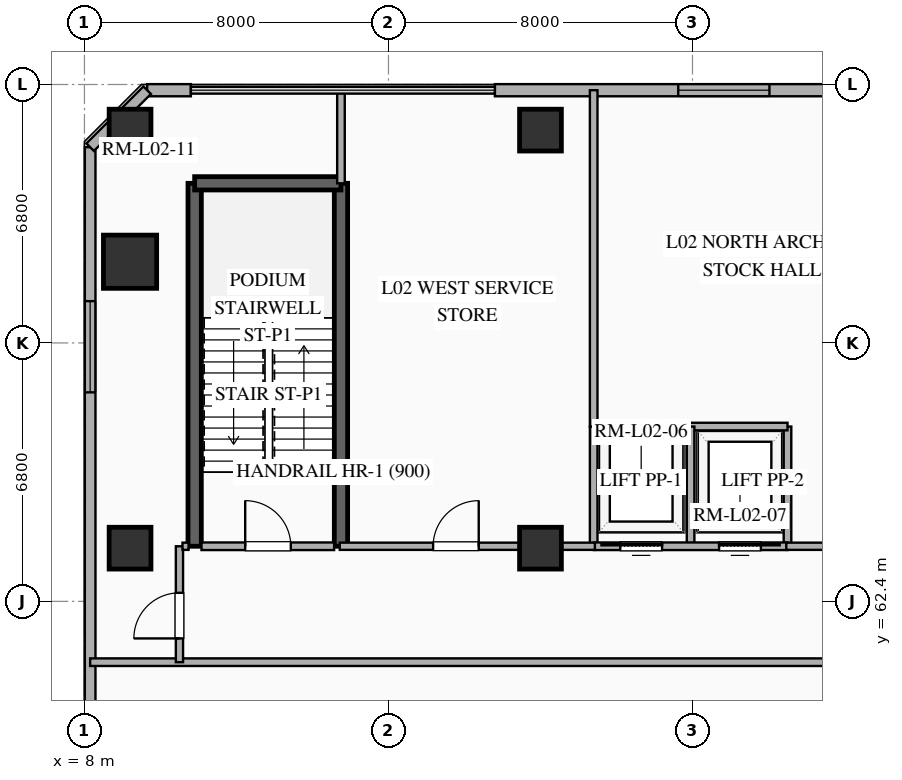
"""IFC4 building model, lengths in metres.
Left out: names, types, materials, properties, quantities, classifications, styles, units other than length and angle.
Written with IfcOpenShell. Run it as: python <this file> out.ifc"""

import sys

from ifc_helpers import new_model, si_unit, direction, frame, frame_2d, origin, origin_2d, place, context, subcontext, project, spatial, rectangle, extrude, element, fill, save


model = new_model("IFC4")
c1 = context("Model", 3, precision=1e-05, world=origin(), true_north=direction((0.0, 1.0)))
c2 = subcontext(c1, "Body", "Model", "MODEL_VIEW")
j1 = project(units=[si_unit("LENGTHUNIT", "METRE"), si_unit("PLANEANGLEUNIT", "RADIAN")], contexts=[c1])
p1 = place(None, origin())
s1 = spatial("IfcSite", under=j1, at=p1, CompositionType="ELEMENT")
p2 = place(p1, origin())
s2 = spatial("IfcBuilding", under=s1, at=p2, CompositionType="ELEMENT")
p3 = place(p2, frame((0.0, 0.0, 11.4)))
s3 = spatial("IfcBuildingStorey", under=s2, at=p3, CompositionType="ELEMENT", Elevation=11.4)
for number, where, z_axis, x_axis in (
    (1, (9.2, 74.8, 0.0), (0.0, 0.0, 1.0), (1.0, 0.0, 0.0)),
    (2, (9.2, 63.8, 0.0), (0.0, 0.0, 1.0), (1.0, 0.0, 0.0)),
    (3, (20.0, 74.8, 0.0), (0.0, 0.0, 1.0), (1.0, 0.0, 0.0)),
    (4, (20.0, 63.8, 0.0), (0.0, 0.0, 1.0), (1.0, 0.0, 0.0)),
):
    element("IfcColumn", number, at=place(p3, frame(where, z_axis=z_axis, x_axis=x_axis)), inside=s3, PredefinedType="COLUMN", context=c2, shape_type="SweptSolid", body=[
        extrude(rectangle(XDim=1.1, YDim=1.1, at=origin_2d()), origin(), (0.0, 0.0, 1.0), 5.1),
    ])
p4 = place(p3, frame((9.2, 71.337, 0.0), z_axis=(0.0, 0.0, 1.0), x_axis=(1.0, 0.0, 0.0)))
e5 = element("IfcColumn", 5, at=p4, inside=s3, PredefinedType="COLUMN", context=c2, shape_type="SweptSolid", body=[
    extrude(rectangle(XDim=1.4, YDim=1.4, at=origin_2d()), origin(), (0.0, 0.0, 1.0), 5.1),
])
for number, where, z_axis, x_axis in (
    (6, (10.9, 63.85, 0.0), (0.0, 0.0, 1.0), (0.0, 1.0, 0.0)),
    (7, (14.75, 63.85, 0.0), (0.0, 0.0, 1.0), (0.0, 1.0, 0.0)),
):
    element("IfcWall", number, at=place(p3, frame(where, z_axis=z_axis, x_axis=x_axis)), inside=s3, PredefinedType="SHEAR", context=c2, shape_type="SweptSolid", body=[
        extrude(rectangle(XDim=9.55, YDim=0.35, at=frame_2d((4.775, 0.0))), origin(), (0.0, 0.0, 1.0), 5.1),
    ])
p5 = place(p3, frame((10.9, 73.4, 0.0), z_axis=(0.0, 0.0, 1.0), x_axis=(1.0, 0.0, 0.0)))
e8 = element("IfcWall", 8, at=p5, inside=s3, PredefinedType="SHEAR", context=c2, shape_type="SweptSolid", body=[
    extrude(rectangle(XDim=3.85, YDim=0.35, at=frame_2d((1.925, 0.0))), origin(), (0.0, 0.0, 1.0), 5.1),
])
p6 = place(p3, frame((10.8, 75.85, 0.0), z_axis=(0.0, 0.0, 1.0), x_axis=(-1.0, 0.0, 0.0)))
e9 = element("IfcWall", 9, at=p6, inside=s3, PredefinedType="SOLIDWALL", context=c2, shape_type="SweptSolid", body=[
    extrude(rectangle(XDim=1.15, YDim=0.32, at=frame_2d((0.575, 0.0))), origin(), (0.0, 0.0, 1.0), 5.1),
])
p7 = place(p3, frame((18.8, 75.85, 0.0), z_axis=(0.0, 0.0, 1.0), x_axis=(1.0, 0.0, 0.0)))
e10 = element("IfcWall", 10, at=p7, inside=s3, PredefinedType="SOLIDWALL", context=c2, shape_type="SweptSolid", body=[
    extrude(rectangle(XDim=10.55, YDim=0.32, at=frame_2d((5.275, 0.0))), origin(), (0.0, 0.0, 1.0), 5.1),
])
p8 = place(p7, frame((4.825, 0.0, 0.9)))
e11 = element("IfcOpeningElement", 11, at=p8, cuts=e10, PredefinedType="OPENING", context=c2, shape_type="SweptSolid", body=[
    extrude(rectangle(XDim=2.4, YDim=2.6, at=frame_2d((1.2, 1.3))), frame((0.0, 0.17, 0.0), z_axis=(0.0, -1.0, 0.0), x_axis=(1.0, 0.0, 0.0)), (0.0, 0.0, 1.0), 0.34),
])
p9 = place(p3, frame((8.15, 33.0, 0.0), z_axis=(0.0, 0.0, 1.0), x_axis=(0.0, 1.0, 0.0)))
e12 = element("IfcWall", 12, at=p9, inside=s3, PredefinedType="SOLIDWALL", context=c2, shape_type="SweptSolid", body=[
    extrude(rectangle(XDim=41.35, YDim=0.28, at=frame_2d((20.675, 0.0))), origin(), (0.0, 0.0, 1.0), 5.1),
])
p10 = place(p9, frame((6.7, 0.0, 0.9)))
e13 = element("IfcOpeningElement", 13, at=p10, cuts=e12, PredefinedType="OPENING", context=c2, shape_type="SweptSolid", body=[
    extrude(rectangle(XDim=2.4, YDim=2.6, at=frame_2d((1.2, 1.3))), frame((0.0, 0.15, 0.0), z_axis=(0.0, -1.0, 0.0), x_axis=(1.0, 0.0, 0.0)), (0.0, 0.0, 1.0), 0.3),
])
p11 = place(p9, frame((21.225, 0.0, 0.9)))
e14 = element("IfcOpeningElement", 14, at=p11, cuts=e12, PredefinedType="OPENING", context=c2, shape_type="SweptSolid", body=[
    extrude(rectangle(XDim=2.4, YDim=2.6, at=frame_2d((1.2, 1.3))), frame((0.0, 0.15, 0.0), z_axis=(0.0, -1.0, 0.0), x_axis=(1.0, 0.0, 0.0)), (0.0, 0.0, 1.0), 0.3),
])
p12 = place(p9, frame((34.9, 0.0, 0.9)))
e15 = element("IfcOpeningElement", 15, at=p12, cuts=e12, PredefinedType="OPENING", context=c2, shape_type="SweptSolid", body=[
    extrude(rectangle(XDim=2.4, YDim=2.6, at=frame_2d((1.2, 1.3))), frame((0.0, 0.15, 0.0), z_axis=(0.0, -1.0, 0.0), x_axis=(1.0, 0.0, 0.0)), (0.0, 0.0, 1.0), 0.3),
])
p13 = place(p3, frame((9.65, 75.85, 0.0), z_axis=(0.0, 0.0, 1.0), x_axis=(-0.707106781187, -0.707106781187, 0.0)))
e16 = element("IfcWall", 16, at=p13, inside=s3, PredefinedType="SOLIDWALL", context=c2, shape_type="SweptSolid", body=[
    extrude(rectangle(XDim=2.121, YDim=0.28, at=frame_2d((1.061, 0.0))), origin(), (0.0, 0.0, 1.0), 5.1),
])
p14 = place(p3, frame((11.08, 63.85, 0.0), z_axis=(0.0, 0.0, 1.0), x_axis=(1.0, 0.0, 0.0)))
e17 = element("IfcWall", 17, at=p14, inside=s3, PredefinedType="SOLIDWALL", context=c2, shape_type="SweptSolid", body=[
    extrude(rectangle(XDim=3.49, YDim=0.2, at=frame_2d((1.745, 0.0))), origin(), (0.0, 0.0, 1.0), 4.3),
])
p15 = place(p14, frame((1.15, 0.0, 0.0)))
e18 = element("IfcOpeningElement", 18, at=p15, cuts=e17, PredefinedType="OPENING", context=c2, shape_type="SweptSolid", body=[
    extrude(rectangle(XDim=1.2, YDim=2.15, at=frame_2d((0.6, 1.075))), frame((0.0, 0.11, 0.0), z_axis=(0.0, -1.0, 0.0), x_axis=(1.0, 0.0, 0.0)), (0.0, 0.0, 1.0), 0.22),
])
for number, where, z_axis, x_axis in (
    (19, (21.4, 63.85, 0.0), (0.0, 0.0, 1.0), (0.0, 1.0, 0.0)),
    (20, (26.5, 63.85, 0.0), (0.0, 0.0, 1.0), (0.0, 1.0, 0.0)),
):
    element("IfcWall", number, at=place(p3, frame(where, z_axis=z_axis, x_axis=x_axis)), inside=s3, PredefinedType="SOLIDWALL", context=c2, shape_type="SweptSolid", body=[
        extrude(rectangle(XDim=3.15, YDim=0.2, at=frame_2d((1.575, 0.0))), origin(), (0.0, 0.0, 1.0), 4.3),
    ])
p16 = place(p3, frame((21.4, 67.0, 0.0), z_axis=(0.0, 0.0, 1.0), x_axis=(1.0, 0.0, 0.0)))
e21 = element("IfcWall", 21, at=p16, inside=s3, PredefinedType="SOLIDWALL", context=c2, shape_type="SweptSolid", body=[
    extrude(rectangle(XDim=5.1, YDim=0.2, at=frame_2d((2.55, 0.0))), origin(), (0.0, 0.0, 1.0), 4.3),
])
p17 = place(p3, frame((23.95, 63.85, 0.0), z_axis=(0.0, 0.0, 1.0), x_axis=(0.0, 1.0, 0.0)))
e22 = element("IfcWall", 22, at=p17, inside=s3, PredefinedType="SOLIDWALL", context=c2, shape_type="SweptSolid", body=[
    extrude(rectangle(XDim=3.15, YDim=0.2, at=frame_2d((1.575, 0.0))), origin(), (0.0, 0.0, 1.0), 4.3),
])
p18 = place(p3, frame((21.4, 63.85, 0.0), z_axis=(0.0, 0.0, 1.0), x_axis=(1.0, 0.0, 0.0)))
e23 = element("IfcWall", 23, at=p18, inside=s3, PredefinedType="SOLIDWALL", context=c2, shape_type="SweptSolid", body=[
    extrude(rectangle(XDim=5.1, YDim=0.2, at=frame_2d((2.55, 0.0))), origin(), (0.0, 0.0, 1.0), 4.3),
])
p19 = place(p18, frame((0.7, 0.0, 0.0)))
e24 = element("IfcOpeningElement", 24, at=p19, cuts=e23, PredefinedType="OPENING", context=c2, shape_type="SweptSolid", body=[
    extrude(rectangle(XDim=1.1, YDim=2.2, at=frame_2d((0.55, 1.1))), frame((0.0, 0.11, 0.0), z_axis=(0.0, -1.0, 0.0), x_axis=(1.0, 0.0, 0.0)), (0.0, 0.0, 1.0), 0.22),
])
p20 = place(p18, frame((3.3, 0.0, 0.0)))
e25 = element("IfcOpeningElement", 25, at=p20, cuts=e23, PredefinedType="OPENING", context=c2, shape_type="SweptSolid", body=[
    extrude(rectangle(XDim=1.1, YDim=2.2, at=frame_2d((0.55, 1.1))), frame((0.0, 0.11, 0.0), z_axis=(0.0, -1.0, 0.0), x_axis=(1.0, 0.0, 0.0)), (0.0, 0.0, 1.0), 0.22),
])
p21 = place(p3, frame((8.15, 60.8, 0.0), z_axis=(0.0, 0.0, 1.0), x_axis=(1.0, 0.0, 0.0)))
e26 = element("IfcWall", 26, at=p21, inside=s3, PredefinedType="PARTITIONING", context=c2, shape_type="SweptSolid", body=[
    extrude(rectangle(XDim=25.85, YDim=0.2, at=frame_2d((12.925, 0.0))), origin(), (0.0, 0.0, 1.0), 4.3),
])
p22 = place(p3, frame((21.4, 67.0, 0.0), z_axis=(0.0, 0.0, 1.0), x_axis=(0.0, 1.0, 0.0)))
e27 = element("IfcWall", 27, at=p22, inside=s3, PredefinedType="PARTITIONING", context=c2, shape_type="SweptSolid", body=[
    extrude(rectangle(XDim=8.85, YDim=0.2, at=frame_2d((4.425, 0.0))), origin(), (0.0, 0.0, 1.0), 4.3),
])
p23 = place(p3, frame((14.718, 63.85, 0.0), z_axis=(0.0, 0.0, 1.0), x_axis=(1.0, 0.0, 0.0)))
e28 = element("IfcWall", 28, at=p23, inside=s3, PredefinedType="PARTITIONING", context=c2, shape_type="SweptSolid", body=[
    extrude(rectangle(XDim=6.714, YDim=0.19, at=frame_2d((3.357, 0.0))), origin(), (0.0, 0.0, 1.0), 4.3),
])
p24 = place(p23, frame((2.457, 0.0, 0.0)))
e29 = element("IfcOpeningElement", 29, at=p24, cuts=e28, PredefinedType="OPENING", context=c2, shape_type="SweptSolid", body=[
    extrude(rectangle(XDim=1.2, YDim=2.25, at=frame_2d((0.6, 1.125))), frame((0.0, 0.105, 0.0), z_axis=(0.0, -1.0, 0.0), x_axis=(1.0, 0.0, 0.0)), (0.0, 0.0, 1.0), 0.21),
])
p25 = place(p3, frame((26.468, 63.85, 0.0), z_axis=(0.0, 0.0, 1.0), x_axis=(1.0, 0.0, 0.0)))
e30 = element("IfcWall", 30, at=p25, inside=s3, PredefinedType="PARTITIONING", context=c2, shape_type="SweptSolid", body=[
    extrude(rectangle(XDim=14.364, YDim=0.19, at=frame_2d((7.182, 0.0))), origin(), (0.0, 0.0, 1.0), 4.3),
])
p26 = place(p25, frame((6.682, 0.0, 0.0)))
e31 = element("IfcOpeningElement", 31, at=p26, cuts=e30, PredefinedType="OPENING", context=c2, shape_type="SweptSolid", body=[
    extrude(rectangle(XDim=0.9, YDim=2.1, at=frame_2d((0.45, 1.05))), frame((0.0, 0.105, 0.0), z_axis=(0.0, -1.0, 0.0), x_axis=(1.0, 0.0, 0.0)), (0.0, 0.0, 1.0), 0.21),
])
p27 = place(p25, frame((11.482, 0.0, 0.0)))
e32 = element("IfcOpeningElement", 32, at=p27, cuts=e30, PredefinedType="OPENING", context=c2, shape_type="SweptSolid", body=[
    extrude(rectangle(XDim=0.9, YDim=2.1, at=frame_2d((0.45, 1.05))), frame((0.0, 0.105, 0.0), z_axis=(0.0, -1.0, 0.0), x_axis=(1.0, 0.0, 0.0)), (0.0, 0.0, 1.0), 0.21),
])
p28 = place(p3, frame((10.5, 60.8, 0.0), z_axis=(0.0, 0.0, 1.0), x_axis=(0.0, 1.0, 0.0)))
e33 = element("IfcWall", 33, at=p28, inside=s3, PredefinedType="PARTITIONING", context=c2, shape_type="SweptSolid", body=[
    extrude(rectangle(XDim=3.05, YDim=0.19, at=frame_2d((1.525, 0.0))), origin(), (0.0, 0.0, 1.0), 4.3),
])
p29 = place(p28, frame((0.625, 0.0, 0.0)))
e34 = element("IfcOpeningElement", 34, at=p29, cuts=e33, PredefinedType="OPENING", context=c2, shape_type="SweptSolid", body=[
    extrude(rectangle(XDim=1.2, YDim=2.25, at=frame_2d((0.6, 1.125))), frame((0.0, 0.105, 0.0), z_axis=(0.0, -1.0, 0.0), x_axis=(1.0, 0.0, 0.0)), (0.0, 0.0, 1.0), 0.21),
])
p30 = place(p3, frame((14.75, 75.85, 0.0), z_axis=(0.0, 0.0, 1.0), x_axis=(0.0, -1.0, 0.0)))
e35 = element("IfcWall", 35, at=p30, inside=s3, PredefinedType="PARTITIONING", context=c2, shape_type="SweptSolid", body=[
    extrude(rectangle(XDim=2.45, YDim=0.2, at=frame_2d((1.225, 0.0))), origin(), (0.0, 0.0, 1.0), 4.3),
])
p31 = place(p3, frame((10.58, 63.85, 0.0), z_axis=(0.0, 0.0, 1.0), x_axis=(1.0, 0.0, 0.0)))
e36 = element("IfcWall", 36, at=p31, inside=s3, PredefinedType="PARTITIONING", context=c2, shape_type="SweptSolid", body=[
    extrude(rectangle(XDim=0.16, YDim=0.19, at=frame_2d((0.08, 0.0))), origin(), (0.0, 0.0, 1.0), 4.3),
])
p32 = place(p8, origin())
e37 = element("IfcWindow", 37, at=p32, inside=s3, PartitioningType="SINGLE_PANEL", PredefinedType="WINDOW", context=c2, shape_type="SweptSolid", body=[
    extrude(rectangle(XDim=2.4, YDim=2.6, at=frame_2d((1.2, 1.3))), frame((0.0, 0.03, 0.0), z_axis=(0.0, -1.0, 0.0), x_axis=(1.0, 0.0, 0.0)), (0.0, 0.0, 1.0), 0.06),
])
fill(e11, e37)
p33 = place(p12, origin())
e38 = element("IfcWindow", 38, at=p33, inside=s3, PartitioningType="SINGLE_PANEL", PredefinedType="WINDOW", context=c2, shape_type="SweptSolid", body=[
    extrude(rectangle(XDim=2.4, YDim=2.6, at=frame_2d((1.2, 1.3))), frame((0.0, 0.03, 0.0), z_axis=(0.0, -1.0, 0.0), x_axis=(1.0, 0.0, 0.0)), (0.0, 0.0, 1.0), 0.06),
])
fill(e15, e38)
p34 = place(p15, origin())
e39 = element("IfcDoor", 39, at=p34, inside=s3, OperationType="SINGLE_SWING_LEFT", PredefinedType="DOOR", context=c2, shape_type="SweptSolid", body=[
    extrude(rectangle(XDim=1.2, YDim=2.15, at=frame_2d((0.6, 1.075))), frame((0.0, 0.025, 0.0), z_axis=(0.0, -1.0, 0.0), x_axis=(1.0, 0.0, 0.0)), (0.0, 0.0, 1.0), 0.05),
])
fill(e18, e39)
p35 = place(p19, origin())
e40 = element("IfcDoor", 40, at=p35, inside=s3, OperationType="SLIDING_TO_LEFT", PredefinedType="DOOR", context=c2, shape_type="SweptSolid", body=[
    extrude(rectangle(XDim=1.1, YDim=2.2, at=frame_2d((0.55, 1.1))), frame((0.0, 0.025, 0.0), z_axis=(0.0, -1.0, 0.0), x_axis=(1.0, 0.0, 0.0)), (0.0, 0.0, 1.0), 0.05),
])
fill(e24, e40)
p36 = place(p20, origin())
e41 = element("IfcDoor", 41, at=p36, inside=s3, OperationType="SLIDING_TO_RIGHT", PredefinedType="DOOR", context=c2, shape_type="SweptSolid", body=[
    extrude(rectangle(XDim=1.1, YDim=2.2, at=frame_2d((0.55, 1.1))), frame((0.0, 0.025, 0.0), z_axis=(0.0, -1.0, 0.0), x_axis=(1.0, 0.0, 0.0)), (0.0, 0.0, 1.0), 0.05),
])
fill(e25, e41)
p37 = place(p24, origin())
e42 = element("IfcDoor", 42, at=p37, inside=s3, OperationType="SINGLE_SWING_RIGHT", PredefinedType="DOOR", context=c2, shape_type="SweptSolid", body=[
    extrude(rectangle(XDim=1.2, YDim=2.25, at=frame_2d((0.6, 1.125))), frame((0.0, 0.025, 0.0), z_axis=(0.0, -1.0, 0.0), x_axis=(1.0, 0.0, 0.0)), (0.0, 0.0, 1.0), 0.05),
])
fill(e29, e42)
p38 = place(p29, origin())
e43 = element("IfcDoor", 43, at=p38, inside=s3, OperationType="SINGLE_SWING_LEFT", PredefinedType="DOOR", context=c2, shape_type="SweptSolid", body=[
    extrude(rectangle(XDim=1.2, YDim=2.25, at=frame_2d((0.6, 1.125))), frame((0.0, 0.025, 0.0), z_axis=(0.0, -1.0, 0.0), x_axis=(1.0, 0.0, 0.0)), (0.0, 0.0, 1.0), 0.05),
])
fill(e34, e43)
save(model, sys.argv[1])
